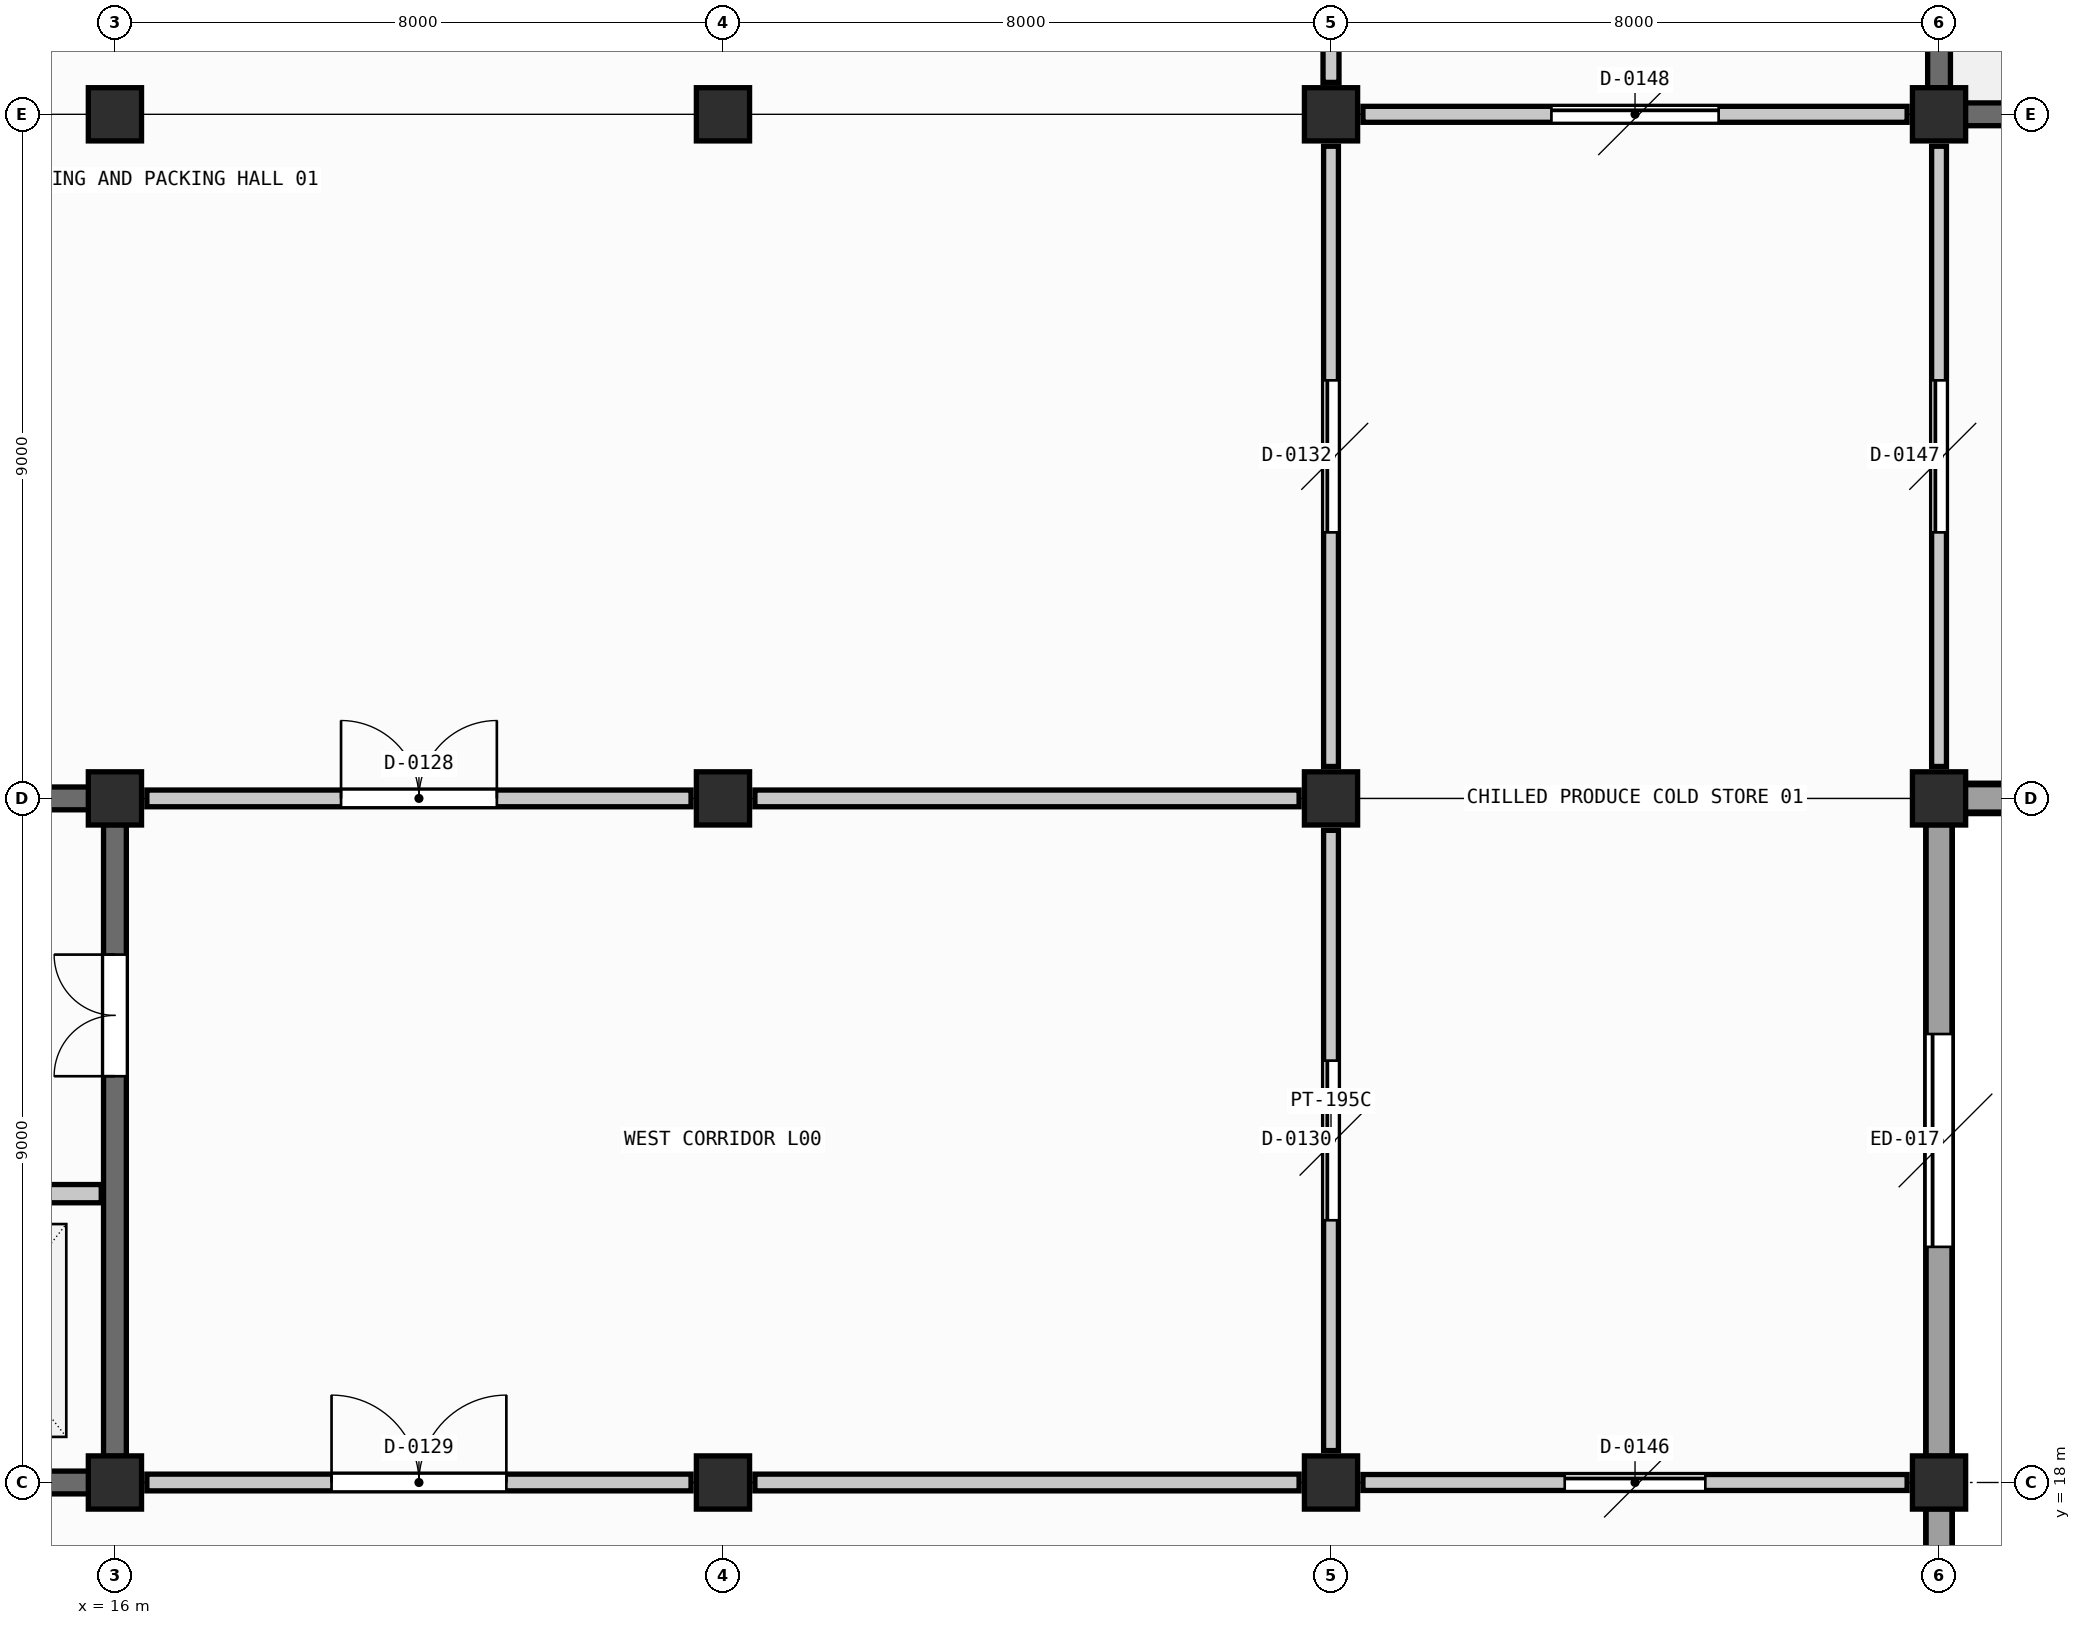
"""IFC4 building model, lengths in metres.
Left out: names, types, materials, properties, quantities, classifications, styles, units other than length and angle.
Written with IfcOpenShell. Run it as: python <this file> out.ifc"""

import sys

from ifc_helpers import new_model, si_unit, direction, frame, frame_2d, origin, origin_2d, place, context, subcontext, project, spatial, rectangle, extrude, element, fill, save


model = new_model("IFC4")
c1 = context("Model", 3, precision=1e-05, world=origin(), true_north=direction((0.0, 1.0)))
c2 = subcontext(c1, "Body", "Model", "MODEL_VIEW")
j1 = project(units=[si_unit("LENGTHUNIT", "METRE"), si_unit("PLANEANGLEUNIT", "RADIAN")], contexts=[c1])
p1 = place(None, origin())
s1 = spatial("IfcSite", under=j1, at=p1, CompositionType="ELEMENT")
p2 = place(p1, origin())
s2 = spatial("IfcBuilding", under=s1, at=p2, CompositionType="ELEMENT")
p3 = place(p2, origin())
s3 = spatial("IfcBuildingStorey", under=s2, at=p3, CompositionType="ELEMENT", Elevation=0.0)
p4 = place(p3, frame((40.0, 0.0, -1.25), z_axis=(0.0, 0.0, 1.0), x_axis=(0.0, 1.0, 0.0)))
e1 = element("IfcWall", 1, at=p4, inside=s3, PredefinedType="STANDARD", context=c2, shape_type="SweptSolid", body=[
    extrude(rectangle(XDim=27.0, YDim=0.35, at=frame_2d((13.5, 0.0))), origin(), (0.0, 0.0, 1.0), 0.9),
])
p5 = place(p3, frame((40.0, 27.0, -1.25), z_axis=(0.0, 0.0, 1.0), x_axis=(1.0, 0.0, 0.0)))
e2 = element("IfcWall", 2, at=p5, inside=s3, PredefinedType="STANDARD", context=c2, shape_type="SweptSolid", body=[
    extrude(rectangle(XDim=23.6, YDim=0.4, at=frame_2d((11.8, 0.0))), origin(), (0.0, 0.0, 1.0), 0.9),
])
for number, where, z_axis, x_axis in (
    (3, (16.0, 18.0, -1.25), (0.0, 0.0, 1.0), (1.0, 0.0, 0.0)),
    (4, (16.0, 27.0, -1.25), (0.0, 0.0, 1.0), (1.0, 0.0, 0.0)),
    (5, (16.0, 36.0, -1.25), (0.0, 0.0, 1.0), (1.0, 0.0, 0.0)),
    (6, (24.0, 18.0, -1.25), (0.0, 0.0, 1.0), (1.0, 0.0, 0.0)),
    (7, (24.0, 27.0, -1.25), (0.0, 0.0, 1.0), (1.0, 0.0, 0.0)),
    (8, (24.0, 36.0, -1.25), (0.0, 0.0, 1.0), (1.0, 0.0, 0.0)),
    (9, (32.0, 18.0, -1.25), (0.0, 0.0, 1.0), (1.0, 0.0, 0.0)),
    (10, (32.0, 27.0, -1.25), (0.0, 0.0, 1.0), (1.0, 0.0, 0.0)),
    (11, (32.0, 36.0, -1.25), (0.0, 0.0, 1.0), (1.0, 0.0, 0.0)),
    (12, (40.0, 18.0, -1.25), (0.0, 0.0, 1.0), (1.0, 0.0, 0.0)),
    (13, (40.0, 27.0, -1.25), (0.0, 0.0, 1.0), (1.0, 0.0, 0.0)),
    (14, (40.0, 36.0, -1.25), (0.0, 0.0, 1.0), (1.0, 0.0, 0.0)),
):
    element("IfcColumn", number, at=place(p3, frame(where, z_axis=z_axis, x_axis=x_axis)), inside=s3, PredefinedType="COLUMN", context=c2, shape_type="SweptSolid", body=[
        extrude(rectangle(XDim=0.7, YDim=0.7, at=origin_2d()), origin(), (0.0, 0.0, 1.0), 6.05),
    ])
p6 = place(p3, frame((40.345, 27.0, 0.0), z_axis=(0.0, 0.0, 1.0), x_axis=(1.0, 0.0, 0.0)))
e15 = element("IfcWall", 15, at=p6, inside=s3, PredefinedType="SOLIDWALL", context=c2, shape_type="SweptSolid", body=[
    extrude(rectangle(XDim=7.31, YDim=0.36, at=frame_2d((3.655, 0.0))), origin(), (0.0, 0.0, 1.0), 3.55),
])
p7 = place(p6, frame((2.155, 0.0, 0.0)))
e16 = element("IfcOpeningElement", 16, at=p7, cuts=e15, PredefinedType="OPENING", context=c2, shape_type="SweptSolid", body=[
    extrude(rectangle(XDim=3.0, YDim=3.2, at=frame_2d((1.5, 1.6))), frame((0.0, 0.19, 0.0), z_axis=(0.0, -1.0, 0.0), x_axis=(1.0, 0.0, 0.0)), (0.0, 0.0, 1.0), 0.38),
])
p8 = place(p3, frame((40.0, 9.345, 0.0), z_axis=(0.0, 0.0, 1.0), x_axis=(0.0, 1.0, 0.0)))
e17 = element("IfcWall", 17, at=p8, inside=s3, PredefinedType="SOLIDWALL", context=c2, shape_type="SweptSolid", body=[
    extrude(rectangle(XDim=8.31, YDim=0.34, at=frame_2d((4.155, 0.0))), origin(), (0.0, 0.0, 1.0), 3.65),
])
p9 = place(p8, frame((2.755, 0.0, 0.0)))
e18 = element("IfcOpeningElement", 18, at=p9, cuts=e17, PredefinedType="OPENING", context=c2, shape_type="SweptSolid", body=[
    extrude(rectangle(XDim=2.8, YDim=3.0, at=frame_2d((1.4, 1.5))), frame((0.0, 0.18, 0.0), z_axis=(0.0, -1.0, 0.0), x_axis=(1.0, 0.0, 0.0)), (0.0, 0.0, 1.0), 0.36),
])
p10 = place(p3, frame((40.0, 18.345, 0.0), z_axis=(0.0, 0.0, 1.0), x_axis=(0.0, 1.0, 0.0)))
e19 = element("IfcWall", 19, at=p10, inside=s3, PredefinedType="SOLIDWALL", context=c2, shape_type="SweptSolid", body=[
    extrude(rectangle(XDim=8.31, YDim=0.34, at=frame_2d((4.155, 0.0))), origin(), (0.0, 0.0, 1.0), 3.65),
])
p11 = place(p10, frame((2.755, 0.0, 0.0)))
e20 = element("IfcOpeningElement", 20, at=p11, cuts=e19, PredefinedType="OPENING", context=c2, shape_type="SweptSolid", body=[
    extrude(rectangle(XDim=2.8, YDim=3.0, at=frame_2d((1.4, 1.5))), frame((0.0, 0.18, 0.0), z_axis=(0.0, -1.0, 0.0), x_axis=(1.0, 0.0, 0.0)), (0.0, 0.0, 1.0), 0.36),
])
for number, where, z_axis, x_axis in (
    (21, (8.345, 18.0, -1.25), (0.0, 0.0, 1.0), (1.0, 0.0, 0.0)),
    (22, (8.345, 27.0, -1.25), (0.0, 0.0, 1.0), (1.0, 0.0, 0.0)),
):
    element("IfcWall", number, at=place(p3, frame(where, z_axis=z_axis, x_axis=x_axis)), inside=s3, PredefinedType="SHEAR", context=c2, shape_type="SweptSolid", body=[
        extrude(rectangle(XDim=7.31, YDim=0.3, at=frame_2d((3.655, 0.0))), origin(), (0.0, 0.0, 1.0), 5.755),
    ])
p12 = place(p3, frame((16.0, 18.345, -1.25), z_axis=(0.0, 0.0, 1.0), x_axis=(0.0, 1.0, 0.0)))
e23 = element("IfcWall", 23, at=p12, inside=s3, PredefinedType="SHEAR", context=c2, shape_type="SweptSolid", body=[
    extrude(rectangle(XDim=8.31, YDim=0.3, at=frame_2d((4.155, 0.0))), origin(), (0.0, 0.0, 1.0), 5.755),
])
p13 = place(p12, frame((5.0, 0.0, 1.25)))
e24 = element("IfcOpeningElement", 24, at=p13, cuts=e23, PredefinedType="OPENING", context=c2, shape_type="SweptSolid", body=[
    extrude(rectangle(XDim=1.6, YDim=2.2, at=frame_2d((0.8, 1.1))), frame((0.0, 0.16, 0.0), z_axis=(0.0, -1.0, 0.0), x_axis=(1.0, 0.0, 0.0)), (0.0, 0.0, 1.0), 0.32),
])
p14 = place(p3, frame((12.75, 21.8, 0.0), z_axis=(0.0, 0.0, 1.0), x_axis=(1.0, 0.0, 0.0)))
e25 = element("IfcWall", 25, at=p14, inside=s3, PredefinedType="SHEAR", context=c2, shape_type="SweptSolid", body=[
    extrude(rectangle(XDim=3.07, YDim=0.24, at=frame_2d((1.535, 0.0))), origin(), (0.0, 0.0, 1.0), 3.855),
])
p15 = place(p14, frame((0.835, 0.0, 0.0)))
e26 = element("IfcOpeningElement", 26, at=p15, cuts=e25, PredefinedType="OPENING", context=c2, shape_type="SweptSolid", body=[
    extrude(rectangle(XDim=1.4, YDim=2.3, at=frame_2d((0.7, 1.15))), frame((0.0, 0.13, 0.0), z_axis=(0.0, -1.0, 0.0), x_axis=(1.0, 0.0, 0.0)), (0.0, 0.0, 1.0), 0.26),
])
p16 = place(p3, frame((40.345, 36.0, -1.25), z_axis=(0.0, 0.0, 1.0), x_axis=(1.0, 0.0, 0.0)))
e27 = element("IfcWall", 27, at=p16, inside=s3, PredefinedType="SHEAR", context=c2, shape_type="SweptSolid", body=[
    extrude(rectangle(XDim=7.31, YDim=0.3, at=frame_2d((3.655, 0.0))), origin(), (0.0, 0.0, 1.0), 5.755),
])
p17 = place(p3, frame((40.0, 36.345, -1.25), z_axis=(0.0, 0.0, 1.0), x_axis=(0.0, 1.0, 0.0)))
e28 = element("IfcWall", 28, at=p17, inside=s3, PredefinedType="SHEAR", context=c2, shape_type="SweptSolid", body=[
    extrude(rectangle(XDim=8.31, YDim=0.3, at=frame_2d((4.155, 0.0))), origin(), (0.0, 0.0, 1.0), 5.755),
])
p18 = place(p3, frame((16.42, 27.0, 0.0), z_axis=(0.0, 0.0, 1.0), x_axis=(1.0, 0.0, 0.0)))
e29 = element("IfcWall", 29, at=p18, inside=s3, PredefinedType="SOLIDWALL", context=c2, shape_type="SweptSolid", body=[
    extrude(rectangle(XDim=7.16, YDim=0.22, at=frame_2d((3.58, 0.0))), origin(), (0.0, 0.0, 1.0), 3.55),
])
p19 = place(p18, frame((2.555, 0.0, 0.0)))
e30 = element("IfcOpeningElement", 30, at=p19, cuts=e29, PredefinedType="OPENING", context=c2, shape_type="SweptSolid", body=[
    extrude(rectangle(XDim=2.05, YDim=2.4, at=frame_2d((1.025, 1.2))), frame((0.0, 0.12, 0.0), z_axis=(0.0, -1.0, 0.0), x_axis=(1.0, 0.0, 0.0)), (0.0, 0.0, 1.0), 0.24),
])
p20 = place(p3, frame((24.42, 27.0, 0.0), z_axis=(0.0, 0.0, 1.0), x_axis=(1.0, 0.0, 0.0)))
e31 = element("IfcWall", 31, at=p20, inside=s3, PredefinedType="SOLIDWALL", context=c2, shape_type="SweptSolid", body=[
    extrude(rectangle(XDim=7.16, YDim=0.22, at=frame_2d((3.58, 0.0))), origin(), (0.0, 0.0, 1.0), 3.55),
])
p21 = place(p3, frame((16.42, 18.0, 0.0), z_axis=(0.0, 0.0, 1.0), x_axis=(1.0, 0.0, 0.0)))
e32 = element("IfcWall", 32, at=p21, inside=s3, PredefinedType="SOLIDWALL", context=c2, shape_type="SweptSolid", body=[
    extrude(rectangle(XDim=7.16, YDim=0.22, at=frame_2d((3.58, 0.0))), origin(), (0.0, 0.0, 1.0), 3.55),
])
p22 = place(p21, frame((2.43, 0.0, 0.0)))
e33 = element("IfcOpeningElement", 33, at=p22, cuts=e32, PredefinedType="OPENING", context=c2, shape_type="SweptSolid", body=[
    extrude(rectangle(XDim=2.3, YDim=2.5, at=frame_2d((1.15, 1.25))), frame((0.0, 0.12, 0.0), z_axis=(0.0, -1.0, 0.0), x_axis=(1.0, 0.0, 0.0)), (0.0, 0.0, 1.0), 0.24),
])
p23 = place(p3, frame((24.42, 18.0, 0.0), z_axis=(0.0, 0.0, 1.0), x_axis=(1.0, 0.0, 0.0)))
e34 = element("IfcWall", 34, at=p23, inside=s3, PredefinedType="SOLIDWALL", context=c2, shape_type="SweptSolid", body=[
    extrude(rectangle(XDim=7.16, YDim=0.22, at=frame_2d((3.58, 0.0))), origin(), (0.0, 0.0, 1.0), 3.55),
])
p24 = place(p3, frame((32.0, 18.42, 0.0), z_axis=(0.0, 0.0, 1.0), x_axis=(0.0, 1.0, 0.0)))
e35 = element("IfcWall", 35, at=p24, inside=s3, PredefinedType="PARTITIONING", context=c2, shape_type="SweptSolid", body=[
    extrude(rectangle(XDim=8.16, YDim=0.195, at=frame_2d((4.08, 0.0))), origin(), (0.0, 0.0, 1.0), 3.65),
])
p25 = place(p24, frame((3.03, 0.0, 0.0)))
e36 = element("IfcOpeningElement", 36, at=p25, cuts=e35, PredefinedType="OPENING", context=c2, shape_type="SweptSolid", body=[
    extrude(rectangle(XDim=2.1, YDim=2.55, at=frame_2d((1.05, 1.275))), frame((0.0, 0.107, 0.0), z_axis=(0.0, -1.0, 0.0), x_axis=(1.0, 0.0, 0.0)), (0.0, 0.0, 1.0), 0.215),
])
p26 = place(p3, frame((32.0, 27.42, 0.0), z_axis=(0.0, 0.0, 1.0), x_axis=(0.0, 1.0, 0.0)))
e37 = element("IfcWall", 37, at=p26, inside=s3, PredefinedType="PARTITIONING", context=c2, shape_type="SweptSolid", body=[
    extrude(rectangle(XDim=8.16, YDim=0.195, at=frame_2d((4.08, 0.0))), origin(), (0.0, 0.0, 1.0), 3.65),
])
p27 = place(p26, frame((3.08, 0.0, 0.0)))
e38 = element("IfcOpeningElement", 38, at=p27, cuts=e37, PredefinedType="OPENING", context=c2, shape_type="SweptSolid", body=[
    extrude(rectangle(XDim=2.0, YDim=2.52, at=frame_2d((1.0, 1.26))), frame((0.0, 0.107, 0.0), z_axis=(0.0, -1.0, 0.0), x_axis=(1.0, 0.0, 0.0)), (0.0, 0.0, 1.0), 0.215),
])
p28 = place(p3, frame((32.0, 36.42, 0.0), z_axis=(0.0, 0.0, 1.0), x_axis=(0.0, 1.0, 0.0)))
e39 = element("IfcWall", 39, at=p28, inside=s3, PredefinedType="PARTITIONING", context=c2, shape_type="SweptSolid", body=[
    extrude(rectangle(XDim=8.16, YDim=0.21, at=frame_2d((4.08, 0.0))), origin(), (0.0, 0.0, 1.0), 3.65),
])
p29 = place(p28, frame((2.98, 0.0, 0.0)))
e40 = element("IfcOpeningElement", 40, at=p29, cuts=e39, PredefinedType="OPENING", context=c2, shape_type="SweptSolid", body=[
    extrude(rectangle(XDim=2.2, YDim=2.6, at=frame_2d((1.1, 1.3))), frame((0.0, 0.115, 0.0), z_axis=(0.0, -1.0, 0.0), x_axis=(1.0, 0.0, 0.0)), (0.0, 0.0, 1.0), 0.23),
])
p30 = place(p3, frame((32.42, 18.0, 0.0), z_axis=(0.0, 0.0, 1.0), x_axis=(1.0, 0.0, 0.0)))
e41 = element("IfcWall", 41, at=p30, inside=s3, PredefinedType="PARTITIONING", context=c2, shape_type="SweptSolid", body=[
    extrude(rectangle(XDim=7.16, YDim=0.21, at=frame_2d((3.58, 0.0))), origin(), (0.0, 0.0, 1.0), 3.55),
])
p31 = place(p30, frame((2.655, 0.0, 0.0)))
e42 = element("IfcOpeningElement", 42, at=p31, cuts=e41, PredefinedType="OPENING", context=c2, shape_type="SweptSolid", body=[
    extrude(rectangle(XDim=1.85, YDim=2.45, at=frame_2d((0.925, 1.225))), frame((0.0, 0.115, 0.0), z_axis=(0.0, -1.0, 0.0), x_axis=(1.0, 0.0, 0.0)), (0.0, 0.0, 1.0), 0.23),
])
p32 = place(p3, frame((40.0, 27.42, 0.0), z_axis=(0.0, 0.0, 1.0), x_axis=(0.0, 1.0, 0.0)))
e43 = element("IfcWall", 43, at=p32, inside=s3, PredefinedType="PARTITIONING", context=c2, shape_type="SweptSolid", body=[
    extrude(rectangle(XDim=8.16, YDim=0.195, at=frame_2d((4.08, 0.0))), origin(), (0.0, 0.0, 1.0), 3.65),
])
p33 = place(p32, frame((3.08, 0.0, 0.0)))
e44 = element("IfcOpeningElement", 44, at=p33, cuts=e43, PredefinedType="OPENING", context=c2, shape_type="SweptSolid", body=[
    extrude(rectangle(XDim=2.0, YDim=2.52, at=frame_2d((1.0, 1.26))), frame((0.0, 0.107, 0.0), z_axis=(0.0, -1.0, 0.0), x_axis=(1.0, 0.0, 0.0)), (0.0, 0.0, 1.0), 0.215),
])
p34 = place(p3, frame((32.42, 36.0, 0.0), z_axis=(0.0, 0.0, 1.0), x_axis=(1.0, 0.0, 0.0)))
e45 = element("IfcWall", 45, at=p34, inside=s3, PredefinedType="PARTITIONING", context=c2, shape_type="SweptSolid", body=[
    extrude(rectangle(XDim=7.16, YDim=0.21, at=frame_2d((3.58, 0.0))), origin(), (0.0, 0.0, 1.0), 3.55),
])
p35 = place(p34, frame((2.48, 0.0, 0.0)))
e46 = element("IfcOpeningElement", 46, at=p35, cuts=e45, PredefinedType="OPENING", context=c2, shape_type="SweptSolid", body=[
    extrude(rectangle(XDim=2.2, YDim=2.6, at=frame_2d((1.1, 1.3))), frame((0.0, 0.115, 0.0), z_axis=(0.0, -1.0, 0.0), x_axis=(1.0, 0.0, 0.0)), (0.0, 0.0, 1.0), 0.23),
])
p36 = place(p11, origin())
e47 = element("IfcDoor", 47, at=p36, inside=s3, OperationType="ROLLINGUP", PredefinedType="GATE", context=c2, shape_type="SweptSolid", body=[
    extrude(rectangle(XDim=2.8, YDim=3.0, at=frame_2d((1.4, 1.5))), frame((0.0, 0.025, 0.0), z_axis=(0.0, -1.0, 0.0), x_axis=(1.0, 0.0, 0.0)), (0.0, 0.0, 1.0), 0.05),
])
fill(e20, e47)
p37 = place(p13, origin())
e48 = element("IfcDoor", 48, at=p37, inside=s3, OperationType="DOUBLE_DOOR_SINGLE_SWING", PredefinedType="DOOR", context=c2, shape_type="SweptSolid", body=[
    extrude(rectangle(XDim=1.6, YDim=2.2, at=frame_2d((0.8, 1.1))), frame((0.0, 0.025, 0.0), z_axis=(0.0, -1.0, 0.0), x_axis=(1.0, 0.0, 0.0)), (0.0, 0.0, 1.0), 0.05),
])
fill(e24, e48)
p38 = place(p19, origin())
e49 = element("IfcDoor", 49, at=p38, inside=s3, OperationType="DOUBLE_DOOR_SINGLE_SWING", PredefinedType="DOOR", context=c2, shape_type="SweptSolid", body=[
    extrude(rectangle(XDim=2.05, YDim=2.4, at=frame_2d((1.025, 1.2))), frame((0.0, 0.025, 0.0), z_axis=(0.0, -1.0, 0.0), x_axis=(1.0, 0.0, 0.0)), (0.0, 0.0, 1.0), 0.05),
])
fill(e30, e49)
p39 = place(p22, origin())
e50 = element("IfcDoor", 50, at=p39, inside=s3, OperationType="DOUBLE_DOOR_SINGLE_SWING", PredefinedType="DOOR", context=c2, shape_type="SweptSolid", body=[
    extrude(rectangle(XDim=2.3, YDim=2.5, at=frame_2d((1.15, 1.25))), frame((0.0, 0.025, 0.0), z_axis=(0.0, -1.0, 0.0), x_axis=(1.0, 0.0, 0.0)), (0.0, 0.0, 1.0), 0.05),
])
fill(e33, e50)
p40 = place(p25, origin())
e51 = element("IfcDoor", 51, at=p40, inside=s3, OperationType="SLIDING_TO_LEFT", PredefinedType="DOOR", context=c2, shape_type="SweptSolid", body=[
    extrude(rectangle(XDim=2.1, YDim=2.55, at=frame_2d((1.05, 1.275))), frame((0.0, 0.025, 0.0), z_axis=(0.0, -1.0, 0.0), x_axis=(1.0, 0.0, 0.0)), (0.0, 0.0, 1.0), 0.05),
])
fill(e36, e51)
p41 = place(p27, origin())
e52 = element("IfcDoor", 52, at=p41, inside=s3, OperationType="SLIDING_TO_LEFT", PredefinedType="DOOR", context=c2, shape_type="SweptSolid", body=[
    extrude(rectangle(XDim=2.0, YDim=2.52, at=frame_2d((1.0, 1.26))), frame((0.0, 0.025, 0.0), z_axis=(0.0, -1.0, 0.0), x_axis=(1.0, 0.0, 0.0)), (0.0, 0.0, 1.0), 0.05),
])
fill(e38, e52)
p42 = place(p31, origin())
e53 = element("IfcDoor", 53, at=p42, inside=s3, OperationType="SLIDING_TO_LEFT", PredefinedType="DOOR", context=c2, shape_type="SweptSolid", body=[
    extrude(rectangle(XDim=1.85, YDim=2.45, at=frame_2d((0.925, 1.225))), frame((0.0, 0.025, 0.0), z_axis=(0.0, -1.0, 0.0), x_axis=(1.0, 0.0, 0.0)), (0.0, 0.0, 1.0), 0.05),
])
fill(e42, e53)
p43 = place(p33, origin())
e54 = element("IfcDoor", 54, at=p43, inside=s3, OperationType="SLIDING_TO_LEFT", PredefinedType="DOOR", context=c2, shape_type="SweptSolid", body=[
    extrude(rectangle(XDim=2.0, YDim=2.52, at=frame_2d((1.0, 1.26))), frame((0.0, 0.025, 0.0), z_axis=(0.0, -1.0, 0.0), x_axis=(1.0, 0.0, 0.0)), (0.0, 0.0, 1.0), 0.05),
])
fill(e44, e54)
p44 = place(p35, origin())
e55 = element("IfcDoor", 55, at=p44, inside=s3, OperationType="SLIDING_TO_LEFT", PredefinedType="DOOR", context=c2, shape_type="SweptSolid", body=[
    extrude(rectangle(XDim=2.2, YDim=2.6, at=frame_2d((1.1, 1.3))), frame((0.0, 0.025, 0.0), z_axis=(0.0, -1.0, 0.0), x_axis=(1.0, 0.0, 0.0)), (0.0, 0.0, 1.0), 0.05),
])
fill(e46, e55)
save(model, sys.argv[1])
